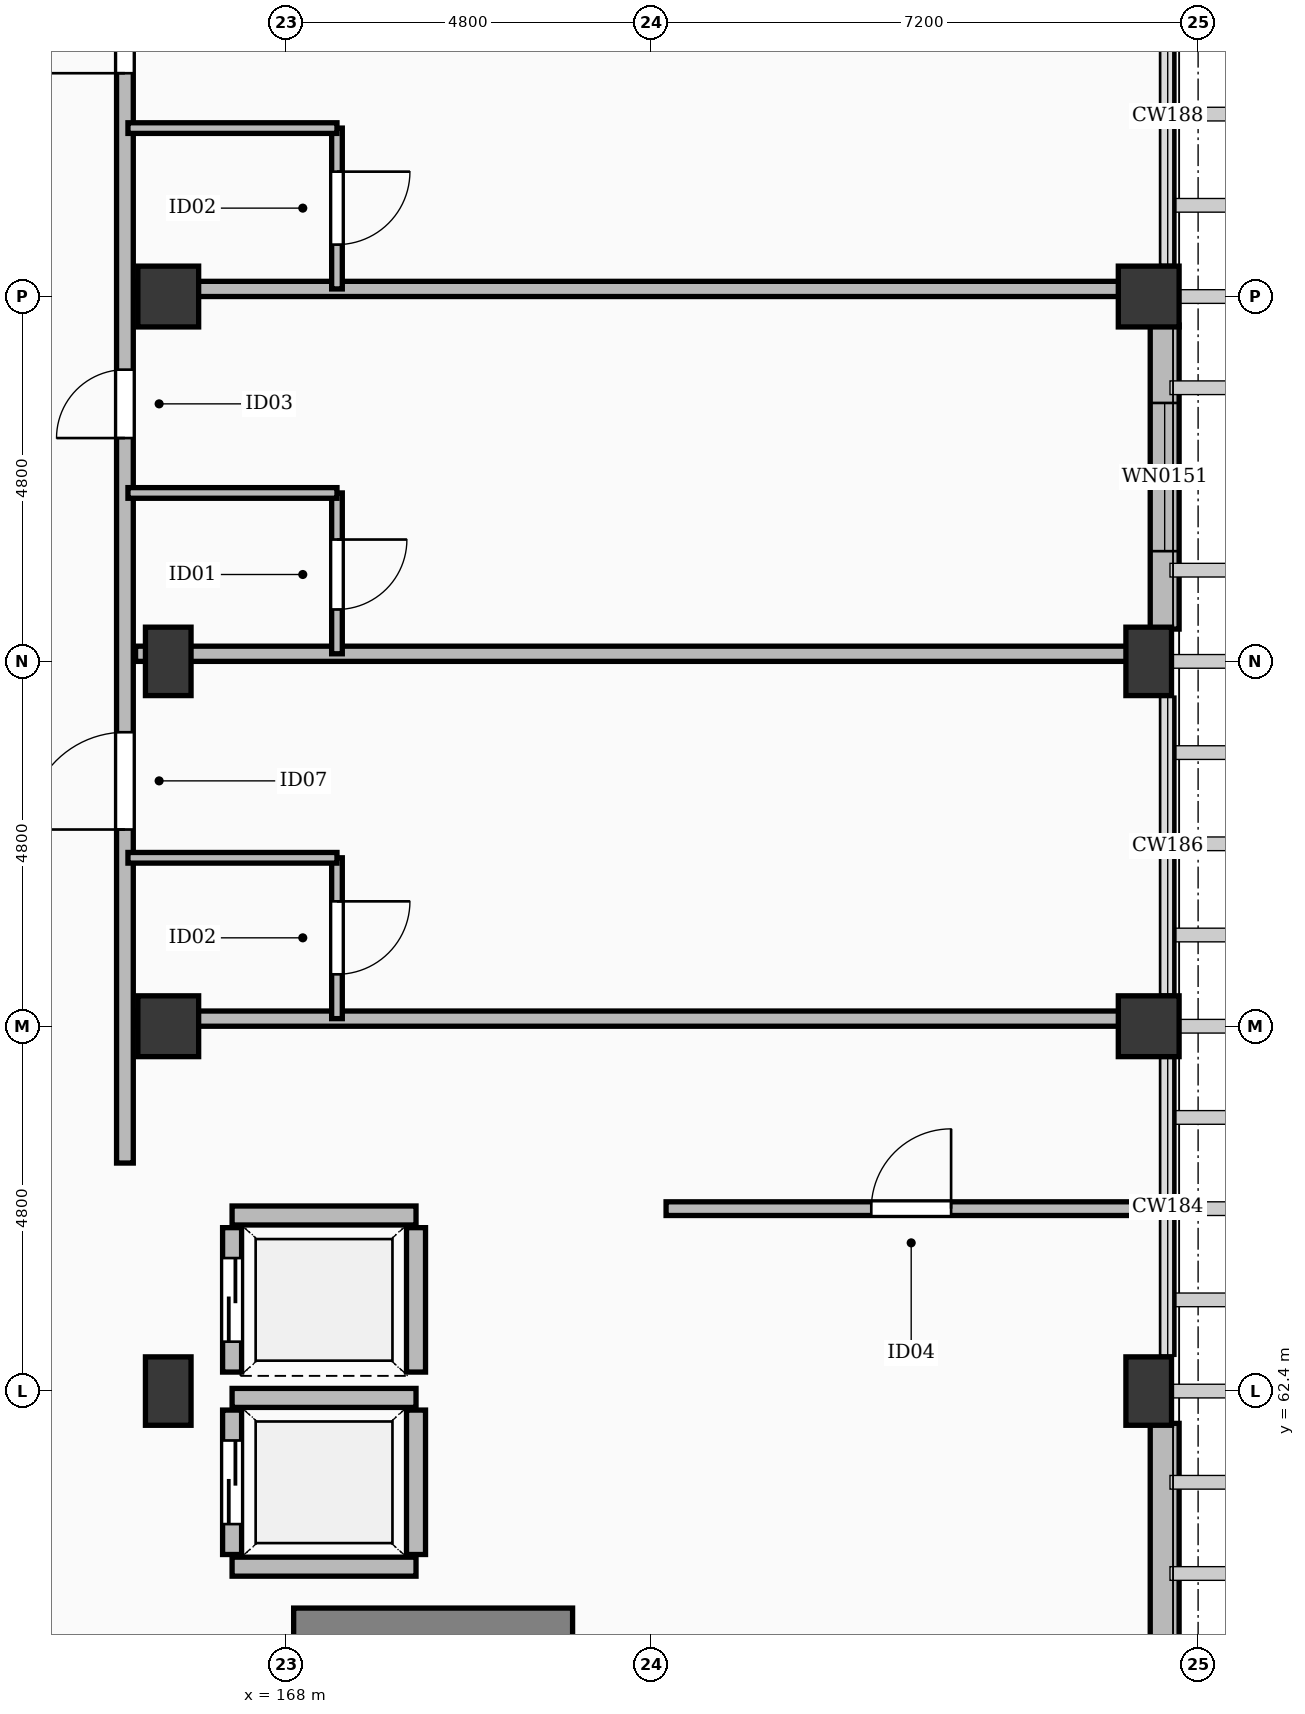
"""IFC4 building model, lengths in metres.
Left out: names, types, materials, properties, quantities, classifications, styles, units other than length and angle.
Written with IfcOpenShell. Run it as: python <this file> out.ifc"""

import sys

from ifc_helpers import new_model, si_unit, direction, frame, frame_2d, origin, origin_2d, place, context, subcontext, project, spatial, rectangle, extrude, element, fill, save


model = new_model("IFC4")
c1 = context("Model", 3, precision=1e-05, world=origin(), true_north=direction((0.0, 1.0)))
c2 = subcontext(c1, "Body", "Model", "MODEL_VIEW")
j1 = project(units=[si_unit("LENGTHUNIT", "METRE"), si_unit("PLANEANGLEUNIT", "RADIAN")], contexts=[c1])
p1 = place(None, origin())
s1 = spatial("IfcSite", under=j1, at=p1, CompositionType="ELEMENT")
p2 = place(p1, origin())
s2 = spatial("IfcBuilding", under=s1, at=p2, CompositionType="ELEMENT")
p3 = place(p2, frame((0.0, 0.0, 21.0)))
s3 = spatial("IfcBuildingStorey", under=s2, at=p3, CompositionType="ELEMENT", Elevation=21.0)
for number, where, z_axis, x_axis in (
    (1, (166.45, 67.2, 0.0), (0.0, 0.0, 1.0), (1.0, 0.0, 0.0)),
    (2, (166.45, 76.8, 0.0), (0.0, 0.0, 1.0), (1.0, 0.0, 0.0)),
    (3, (179.35, 67.2, 0.0), (0.0, 0.0, 1.0), (1.0, 0.0, 0.0)),
    (4, (179.35, 76.8, 0.0), (0.0, 0.0, 1.0), (1.0, 0.0, 0.0)),
):
    element("IfcColumn", number, at=place(p3, frame(where, z_axis=z_axis, x_axis=x_axis)), inside=s3, PredefinedType="COLUMN", context=c2, shape_type="SweptSolid", body=[
        extrude(rectangle(XDim=0.8, YDim=0.8, at=origin_2d()), origin(), (0.0, 0.0, 1.0), 3.6),
    ])
for number, where, z_axis, x_axis in (
    (5, (166.45, 62.4, -0.26), (0.0, 0.0, 1.0), (1.0, 0.0, 0.0)),
    (6, (166.45, 72.0, -0.26), (0.0, 0.0, 1.0), (1.0, 0.0, 0.0)),
    (7, (179.35, 62.4, -0.26), (0.0, 0.0, 1.0), (1.0, 0.0, 0.0)),
    (8, (179.35, 72.0, -0.26), (0.0, 0.0, 1.0), (1.0, 0.0, 0.0)),
):
    element("IfcColumn", number, at=place(p3, frame(where, z_axis=z_axis, x_axis=x_axis)), inside=s3, PredefinedType="COLUMN", context=c2, shape_type="SweptSolid", body=[
        extrude(rectangle(XDim=0.6, YDim=0.9, at=origin_2d()), origin(), (0.0, 0.0, 1.0), 3.86),
    ])
p4 = place(p3, frame((179.56, 61.975, 0.0), z_axis=(0.0, 0.0, 1.0), x_axis=(0.0, -1.0, 0.0)))
e9 = element("IfcWall", 9, at=p4, inside=s3, PredefinedType="SOLIDWALL", context=c2, shape_type="SweptSolid", body=[
    extrude(rectangle(XDim=4.0, YDim=0.38, at=frame_2d((2.0, 0.0))), origin(), (0.0, 0.0, 1.0), 2.582),
])
p5 = place(p3, frame((179.56, 76.425, 0.0), z_axis=(0.0, 0.0, 1.0), x_axis=(0.0, -1.0, 0.0)))
e10 = element("IfcWall", 10, at=p5, inside=s3, PredefinedType="SOLIDWALL", context=c2, shape_type="SweptSolid", body=[
    extrude(rectangle(XDim=4.0, YDim=0.38, at=frame_2d((2.0, 0.0))), origin(), (0.0, 0.0, 1.0), 2.582),
])
p6 = place(p5, frame((1.025, 0.0, 0.55)))
e11 = element("IfcOpeningElement", 11, at=p6, cuts=e10, PredefinedType="OPENING", context=c2, shape_type="SweptSolid", body=[
    extrude(rectangle(XDim=1.95, YDim=1.77, at=frame_2d((0.975, 0.885))), frame((0.0, 0.202, 0.0), z_axis=(0.0, -1.0, 0.0), x_axis=(1.0, 0.0, 0.0)), (0.0, 0.0, 1.0), 0.404),
])
p7 = place(p3, frame((168.1, 59.32, 0.0), z_axis=(0.0, 0.0, 1.0), x_axis=(1.0, 0.0, 0.0)))
e12 = element("IfcWall", 12, at=p7, inside=s3, PredefinedType="SHEAR", context=c2, shape_type="SweptSolid", body=[
    extrude(rectangle(XDim=3.67, YDim=0.45, at=frame_2d((1.835, 0.0))), origin(), (0.0, 0.0, 1.0), 3.34),
])
p8 = place(p3, frame((167.29, 60.09, 0.0), z_axis=(0.0, 0.0, 1.0), x_axis=(1.0, 0.0, 0.0)))
e13 = element("IfcWall", 13, at=p8, inside=s3, PredefinedType="SOLIDWALL", context=c2, shape_type="SweptSolid", body=[
    extrude(rectangle(XDim=2.42, YDim=0.25, at=frame_2d((1.21, 0.0))), origin(), (0.0, 0.0, 1.0), 3.34),
])
p9 = place(p3, frame((167.29, 62.31, 0.0), z_axis=(0.0, 0.0, 1.0), x_axis=(1.0, 0.0, 0.0)))
e14 = element("IfcWall", 14, at=p9, inside=s3, PredefinedType="SOLIDWALL", context=c2, shape_type="SweptSolid", body=[
    extrude(rectangle(XDim=2.42, YDim=0.25, at=frame_2d((1.21, 0.0))), origin(), (0.0, 0.0, 1.0), 2.652),
])
p10 = place(p3, frame((167.29, 60.25, 0.0), z_axis=(0.0, 0.0, 1.0), x_axis=(0.0, 1.0, 0.0)))
e15 = element("IfcWall", 15, at=p10, inside=s3, PredefinedType="SOLIDWALL", context=c2, shape_type="SweptSolid", body=[
    extrude(rectangle(XDim=1.9, YDim=0.25, at=frame_2d((0.95, 0.0))), origin(), (0.0, 0.0, 1.0), 2.652),
])
p11 = place(p10, frame((0.4, 0.0, 0.0)))
e16 = element("IfcOpeningElement", 16, at=p11, cuts=e15, PredefinedType="OPENING", context=c2, shape_type="SweptSolid", body=[
    extrude(rectangle(XDim=1.1, YDim=2.2, at=frame_2d((0.55, 1.1))), frame((0.0, 0.137, 0.0), z_axis=(0.0, -1.0, 0.0), x_axis=(1.0, 0.0, 0.0)), (0.0, 0.0, 1.0), 0.274),
])
p12 = place(p3, frame((169.71, 60.25, 0.0), z_axis=(0.0, 0.0, 1.0), x_axis=(0.0, 1.0, 0.0)))
e17 = element("IfcWall", 17, at=p12, inside=s3, PredefinedType="SOLIDWALL", context=c2, shape_type="SweptSolid", body=[
    extrude(rectangle(XDim=1.9, YDim=0.25, at=frame_2d((0.95, 0.0))), origin(), (0.0, 0.0, 1.0), 2.652),
])
p13 = place(p3, frame((167.29, 64.71, 0.0), z_axis=(0.0, 0.0, 1.0), x_axis=(1.0, 0.0, 0.0)))
e18 = element("IfcWall", 18, at=p13, inside=s3, PredefinedType="SOLIDWALL", context=c2, shape_type="SweptSolid", body=[
    extrude(rectangle(XDim=2.42, YDim=0.25, at=frame_2d((1.21, 0.0))), origin(), (0.0, 0.0, 1.0), 3.34),
])
p14 = place(p3, frame((167.29, 62.65, 0.0), z_axis=(0.0, 0.0, 1.0), x_axis=(0.0, 1.0, 0.0)))
e19 = element("IfcWall", 19, at=p14, inside=s3, PredefinedType="SOLIDWALL", context=c2, shape_type="SweptSolid", body=[
    extrude(rectangle(XDim=1.9, YDim=0.25, at=frame_2d((0.95, 0.0))), origin(), (0.0, 0.0, 1.0), 2.652),
])
p15 = place(p14, frame((0.4, 0.0, 0.0)))
e20 = element("IfcOpeningElement", 20, at=p15, cuts=e19, PredefinedType="OPENING", context=c2, shape_type="SweptSolid", body=[
    extrude(rectangle(XDim=1.1, YDim=2.2, at=frame_2d((0.55, 1.1))), frame((0.0, 0.137, 0.0), z_axis=(0.0, -1.0, 0.0), x_axis=(1.0, 0.0, 0.0)), (0.0, 0.0, 1.0), 0.274),
])
p16 = place(p3, frame((169.71, 62.65, 0.0), z_axis=(0.0, 0.0, 1.0), x_axis=(0.0, 1.0, 0.0)))
e21 = element("IfcWall", 21, at=p16, inside=s3, PredefinedType="SOLIDWALL", context=c2, shape_type="SweptSolid", body=[
    extrude(rectangle(XDim=1.9, YDim=0.25, at=frame_2d((0.95, 0.0))), origin(), (0.0, 0.0, 1.0), 2.652),
])
p17 = place(p3, frame((165.88, 65.4, 0.0), z_axis=(0.0, 0.0, 1.0), x_axis=(0.0, 1.0, 0.0)))
e22 = element("IfcWall", 22, at=p17, inside=s3, PredefinedType="PARTITIONING", context=c2, shape_type="SweptSolid", body=[
    extrude(rectangle(XDim=60.25, YDim=0.22, at=frame_2d((30.125, 0.0))), origin(), (0.0, 0.0, 1.0), 2.582),
])
p18 = place(p17, frame((4.388, 0.0, 0.0)))
e23 = element("IfcOpeningElement", 23, at=p18, cuts=e22, PredefinedType="OPENING", context=c2, shape_type="SweptSolid", body=[
    extrude(rectangle(XDim=1.28, YDim=2.16, at=frame_2d((0.64, 1.08))), frame((0.0, 0.122, 0.0), z_axis=(0.0, -1.0, 0.0), x_axis=(1.0, 0.0, 0.0)), (0.0, 0.0, 1.0), 0.244),
])
p19 = place(p17, frame((9.538, 0.0, 0.0)))
e24 = element("IfcOpeningElement", 24, at=p19, cuts=e22, PredefinedType="OPENING", context=c2, shape_type="SweptSolid", body=[
    extrude(rectangle(XDim=0.9, YDim=2.08, at=frame_2d((0.45, 1.04))), frame((0.0, 0.122, 0.0), z_axis=(0.0, -1.0, 0.0), x_axis=(1.0, 0.0, 0.0)), (0.0, 0.0, 1.0), 0.244),
])
p20 = place(p17, frame((14.338, 0.0, 0.0)))
e25 = element("IfcOpeningElement", 25, at=p20, cuts=e22, PredefinedType="OPENING", context=c2, shape_type="SweptSolid", body=[
    extrude(rectangle(XDim=1.05, YDim=2.22, at=frame_2d((0.525, 1.11))), frame((0.0, 0.122, 0.0), z_axis=(0.0, -1.0, 0.0), x_axis=(1.0, 0.0, 0.0)), (0.0, 0.0, 1.0), 0.244),
])
p21 = place(p17, frame((19.138, 0.0, 0.0)))
e26 = element("IfcOpeningElement", 26, at=p21, cuts=e22, PredefinedType="OPENING", context=c2, shape_type="SweptSolid", body=[
    extrude(rectangle(XDim=1.02, YDim=2.2, at=frame_2d((0.51, 1.1))), frame((0.0, 0.122, 0.0), z_axis=(0.0, -1.0, 0.0), x_axis=(1.0, 0.0, 0.0)), (0.0, 0.0, 1.0), 0.244),
])
p22 = place(p17, frame((23.938, 0.0, 0.0)))
e27 = element("IfcOpeningElement", 27, at=p22, cuts=e22, PredefinedType="OPENING", context=c2, shape_type="SweptSolid", body=[
    extrude(rectangle(XDim=1.14, YDim=2.26, at=frame_2d((0.57, 1.13))), frame((0.0, 0.122, 0.0), z_axis=(0.0, -1.0, 0.0), x_axis=(1.0, 0.0, 0.0)), (0.0, 0.0, 1.0), 0.244),
])
p23 = place(p17, frame((28.738, 0.0, 0.0)))
e28 = element("IfcOpeningElement", 28, at=p23, cuts=e22, PredefinedType="OPENING", context=c2, shape_type="SweptSolid", body=[
    extrude(rectangle(XDim=0.98, YDim=2.15, at=frame_2d((0.49, 1.075))), frame((0.0, 0.122, 0.0), z_axis=(0.0, -1.0, 0.0), x_axis=(1.0, 0.0, 0.0)), (0.0, 0.0, 1.0), 0.244),
])
p24 = place(p17, frame((33.188, 0.0, 0.0)))
e29 = element("IfcOpeningElement", 29, at=p24, cuts=e22, PredefinedType="OPENING", context=c2, shape_type="SweptSolid", body=[
    extrude(rectangle(XDim=1.28, YDim=2.16, at=frame_2d((0.64, 1.08))), frame((0.0, 0.122, 0.0), z_axis=(0.0, -1.0, 0.0), x_axis=(1.0, 0.0, 0.0)), (0.0, 0.0, 1.0), 0.244),
])
p25 = place(p17, frame((38.338, 0.0, 0.0)))
e30 = element("IfcOpeningElement", 30, at=p25, cuts=e22, PredefinedType="OPENING", context=c2, shape_type="SweptSolid", body=[
    extrude(rectangle(XDim=0.9, YDim=2.08, at=frame_2d((0.45, 1.04))), frame((0.0, 0.122, 0.0), z_axis=(0.0, -1.0, 0.0), x_axis=(1.0, 0.0, 0.0)), (0.0, 0.0, 1.0), 0.244),
])
p26 = place(p17, frame((43.138, 0.0, 0.0)))
e31 = element("IfcOpeningElement", 31, at=p26, cuts=e22, PredefinedType="OPENING", context=c2, shape_type="SweptSolid", body=[
    extrude(rectangle(XDim=1.05, YDim=2.22, at=frame_2d((0.525, 1.11))), frame((0.0, 0.122, 0.0), z_axis=(0.0, -1.0, 0.0), x_axis=(1.0, 0.0, 0.0)), (0.0, 0.0, 1.0), 0.244),
])
p27 = place(p17, frame((47.938, 0.0, 0.0)))
e32 = element("IfcOpeningElement", 32, at=p27, cuts=e22, PredefinedType="OPENING", context=c2, shape_type="SweptSolid", body=[
    extrude(rectangle(XDim=1.02, YDim=2.2, at=frame_2d((0.51, 1.1))), frame((0.0, 0.122, 0.0), z_axis=(0.0, -1.0, 0.0), x_axis=(1.0, 0.0, 0.0)), (0.0, 0.0, 1.0), 0.244),
])
p28 = place(p17, frame((52.738, 0.0, 0.0)))
e33 = element("IfcOpeningElement", 33, at=p28, cuts=e22, PredefinedType="OPENING", context=c2, shape_type="SweptSolid", body=[
    extrude(rectangle(XDim=1.14, YDim=2.26, at=frame_2d((0.57, 1.13))), frame((0.0, 0.122, 0.0), z_axis=(0.0, -1.0, 0.0), x_axis=(1.0, 0.0, 0.0)), (0.0, 0.0, 1.0), 0.244),
])
p29 = place(p17, frame((57.538, 0.0, 0.0)))
e34 = element("IfcOpeningElement", 34, at=p29, cuts=e22, PredefinedType="OPENING", context=c2, shape_type="SweptSolid", body=[
    extrude(rectangle(XDim=0.98, YDim=2.15, at=frame_2d((0.49, 1.075))), frame((0.0, 0.122, 0.0), z_axis=(0.0, -1.0, 0.0), x_axis=(1.0, 0.0, 0.0)), (0.0, 0.0, 1.0), 0.244),
])
p30 = place(p3, frame((173.0, 64.8, 0.0), z_axis=(0.0, 0.0, 1.0), x_axis=(1.0, 0.0, 0.0)))
e35 = element("IfcWall", 35, at=p30, inside=s3, PredefinedType="PARTITIONING", context=c2, shape_type="SweptSolid", body=[
    extrude(rectangle(XDim=6.2, YDim=0.18, at=frame_2d((3.1, 0.0))), origin(), (0.0, 0.0, 1.0), 2.582),
])
p31 = place(p30, frame((2.7, 0.0, 0.0)))
e36 = element("IfcOpeningElement", 36, at=p31, cuts=e35, PredefinedType="OPENING", context=c2, shape_type="SweptSolid", body=[
    extrude(rectangle(XDim=1.05, YDim=2.18, at=frame_2d((0.525, 1.09))), frame((0.0, 0.102, 0.0), z_axis=(0.0, -1.0, 0.0), x_axis=(1.0, 0.0, 0.0)), (0.0, 0.0, 1.0), 0.204),
])
p32 = place(p3, frame((166.02, 67.3, 0.0), z_axis=(0.0, 0.0, 1.0), x_axis=(1.0, 0.0, 0.0)))
e37 = element("IfcWall", 37, at=p32, inside=s3, PredefinedType="PARTITIONING", context=c2, shape_type="SweptSolid", body=[
    extrude(rectangle(XDim=13.23, YDim=0.2, at=frame_2d((6.615, 0.0))), origin(), (0.0, 0.0, 1.0), 2.582),
])
p33 = place(p3, frame((168.67, 67.3, 0.0), z_axis=(0.0, 0.0, 1.0), x_axis=(0.0, 1.0, 0.0)))
e38 = element("IfcWall", 38, at=p33, inside=s3, PredefinedType="PARTITIONING", context=c2, shape_type="SweptSolid", body=[
    extrude(rectangle(XDim=2.116, YDim=0.14, at=frame_2d((1.058, 0.0))), origin(), (0.0, 0.0, 1.0), 2.652),
])
p34 = place(p33, frame((0.583, 0.0, 0.0)))
e39 = element("IfcOpeningElement", 39, at=p34, cuts=e38, PredefinedType="OPENING", context=c2, shape_type="SweptSolid", body=[
    extrude(rectangle(XDim=0.96, YDim=2.12, at=frame_2d((0.48, 1.06))), frame((0.0, 0.082, 0.0), z_axis=(0.0, -1.0, 0.0), x_axis=(1.0, 0.0, 0.0)), (0.0, 0.0, 1.0), 0.164),
])
p35 = place(p3, frame((165.92, 69.416, 0.0), z_axis=(0.0, 0.0, 1.0), x_axis=(1.0, 0.0, 0.0)))
e40 = element("IfcWall", 40, at=p35, inside=s3, PredefinedType="PARTITIONING", context=c2, shape_type="SweptSolid", body=[
    extrude(rectangle(XDim=2.75, YDim=0.14, at=frame_2d((1.375, 0.0))), origin(), (0.0, 0.0, 1.0), 2.652),
])
p36 = place(p3, frame((166.02, 72.1, 0.0), z_axis=(0.0, 0.0, 1.0), x_axis=(1.0, 0.0, 0.0)))
e41 = element("IfcWall", 41, at=p36, inside=s3, PredefinedType="PARTITIONING", context=c2, shape_type="SweptSolid", body=[
    extrude(rectangle(XDim=13.23, YDim=0.2, at=frame_2d((6.615, 0.0))), origin(), (0.0, 0.0, 1.0), 2.582),
])
p37 = place(p3, frame((168.67, 72.1, 0.0), z_axis=(0.0, 0.0, 1.0), x_axis=(0.0, 1.0, 0.0)))
e42 = element("IfcWall", 42, at=p37, inside=s3, PredefinedType="PARTITIONING", context=c2, shape_type="SweptSolid", body=[
    extrude(rectangle(XDim=2.116, YDim=0.14, at=frame_2d((1.058, 0.0))), origin(), (0.0, 0.0, 1.0), 2.652),
])
p38 = place(p37, frame((0.583, 0.0, 0.0)))
e43 = element("IfcOpeningElement", 43, at=p38, cuts=e42, PredefinedType="OPENING", context=c2, shape_type="SweptSolid", body=[
    extrude(rectangle(XDim=0.92, YDim=2.1, at=frame_2d((0.46, 1.05))), frame((0.0, 0.082, 0.0), z_axis=(0.0, -1.0, 0.0), x_axis=(1.0, 0.0, 0.0)), (0.0, 0.0, 1.0), 0.164),
])
p39 = place(p3, frame((165.92, 74.216, 0.0), z_axis=(0.0, 0.0, 1.0), x_axis=(1.0, 0.0, 0.0)))
e44 = element("IfcWall", 44, at=p39, inside=s3, PredefinedType="PARTITIONING", context=c2, shape_type="SweptSolid", body=[
    extrude(rectangle(XDim=2.75, YDim=0.14, at=frame_2d((1.375, 0.0))), origin(), (0.0, 0.0, 1.0), 2.652),
])
p40 = place(p3, frame((166.02, 76.9, 0.0), z_axis=(0.0, 0.0, 1.0), x_axis=(1.0, 0.0, 0.0)))
e45 = element("IfcWall", 45, at=p40, inside=s3, PredefinedType="PARTITIONING", context=c2, shape_type="SweptSolid", body=[
    extrude(rectangle(XDim=13.23, YDim=0.2, at=frame_2d((6.615, 0.0))), origin(), (0.0, 0.0, 1.0), 2.582),
])
p41 = place(p3, frame((168.67, 76.9, 0.0), z_axis=(0.0, 0.0, 1.0), x_axis=(0.0, 1.0, 0.0)))
e46 = element("IfcWall", 46, at=p41, inside=s3, PredefinedType="PARTITIONING", context=c2, shape_type="SweptSolid", body=[
    extrude(rectangle(XDim=2.116, YDim=0.14, at=frame_2d((1.058, 0.0))), origin(), (0.0, 0.0, 1.0), 2.652),
])
p42 = place(p41, frame((0.583, 0.0, 0.0)))
e47 = element("IfcOpeningElement", 47, at=p42, cuts=e46, PredefinedType="OPENING", context=c2, shape_type="SweptSolid", body=[
    extrude(rectangle(XDim=0.96, YDim=2.12, at=frame_2d((0.48, 1.06))), frame((0.0, 0.082, 0.0), z_axis=(0.0, -1.0, 0.0), x_axis=(1.0, 0.0, 0.0)), (0.0, 0.0, 1.0), 0.164),
])
p43 = place(p3, frame((165.92, 79.016, 0.0), z_axis=(0.0, 0.0, 1.0), x_axis=(1.0, 0.0, 0.0)))
e48 = element("IfcWall", 48, at=p43, inside=s3, PredefinedType="PARTITIONING", context=c2, shape_type="SweptSolid", body=[
    extrude(rectangle(XDim=2.75, YDim=0.14, at=frame_2d((1.375, 0.0))), origin(), (0.0, 0.0, 1.0), 2.652),
])
p44 = place(p6, origin())
e49 = element("IfcWindow", 49, at=p44, inside=s3, PartitioningType="SINGLE_PANEL", PredefinedType="WINDOW", context=c2, shape_type="SweptSolid", body=[
    extrude(rectangle(XDim=1.95, YDim=1.77, at=frame_2d((0.975, 0.885))), frame((0.0, 0.03, 0.0), z_axis=(0.0, -1.0, 0.0), x_axis=(1.0, 0.0, 0.0)), (0.0, 0.0, 1.0), 0.06),
])
fill(e11, e49)
p45 = place(p11, origin())
e50 = element("IfcDoor", 50, at=p45, inside=s3, OperationType="SLIDING_TO_LEFT", PredefinedType="DOOR", context=c2, shape_type="SweptSolid", body=[
    extrude(rectangle(XDim=1.1, YDim=2.2, at=frame_2d((0.55, 1.1))), frame((0.0, 0.025, 0.0), z_axis=(0.0, -1.0, 0.0), x_axis=(1.0, 0.0, 0.0)), (0.0, 0.0, 1.0), 0.05),
])
fill(e16, e50)
p46 = place(p15, origin())
e51 = element("IfcDoor", 51, at=p46, inside=s3, OperationType="SLIDING_TO_LEFT", PredefinedType="DOOR", context=c2, shape_type="SweptSolid", body=[
    extrude(rectangle(XDim=1.1, YDim=2.2, at=frame_2d((0.55, 1.1))), frame((0.0, 0.025, 0.0), z_axis=(0.0, -1.0, 0.0), x_axis=(1.0, 0.0, 0.0)), (0.0, 0.0, 1.0), 0.05),
])
fill(e20, e51)
p47 = place(p31, origin())
e52 = element("IfcDoor", 52, at=p47, inside=s3, OperationType="SINGLE_SWING_RIGHT", PredefinedType="DOOR", context=c2, shape_type="SweptSolid", body=[
    extrude(rectangle(XDim=1.05, YDim=2.18, at=frame_2d((0.525, 1.09))), frame((0.0, 0.025, 0.0), z_axis=(0.0, -1.0, 0.0), x_axis=(1.0, 0.0, 0.0)), (0.0, 0.0, 1.0), 0.05),
])
fill(e36, e52)
p48 = place(p18, origin())
e53 = element("IfcDoor", 53, at=p48, inside=s3, OperationType="SINGLE_SWING_LEFT", PredefinedType="DOOR", context=c2, shape_type="SweptSolid", body=[
    extrude(rectangle(XDim=1.28, YDim=2.16, at=frame_2d((0.64, 1.08))), frame((0.0, 0.025, 0.0), z_axis=(0.0, -1.0, 0.0), x_axis=(1.0, 0.0, 0.0)), (0.0, 0.0, 1.0), 0.05),
])
fill(e23, e53)
p49 = place(p34, frame((0.96, 0.0, 0.0), z_axis=(0.0, 0.0, 1.0), x_axis=(-1.0, 0.0, 0.0)))
e54 = element("IfcDoor", 54, at=p49, inside=s3, OperationType="SINGLE_SWING_RIGHT", PredefinedType="DOOR", context=c2, shape_type="SweptSolid", body=[
    extrude(rectangle(XDim=0.96, YDim=2.12, at=frame_2d((0.48, 1.06))), frame((0.0, 0.025, 0.0), z_axis=(0.0, -1.0, 0.0), x_axis=(1.0, 0.0, 0.0)), (0.0, 0.0, 1.0), 0.05),
])
fill(e39, e54)
p50 = place(p19, origin())
e55 = element("IfcDoor", 55, at=p50, inside=s3, OperationType="SINGLE_SWING_LEFT", PredefinedType="DOOR", context=c2, shape_type="SweptSolid", body=[
    extrude(rectangle(XDim=0.9, YDim=2.08, at=frame_2d((0.45, 1.04))), frame((0.0, 0.025, 0.0), z_axis=(0.0, -1.0, 0.0), x_axis=(1.0, 0.0, 0.0)), (0.0, 0.0, 1.0), 0.05),
])
fill(e24, e55)
p51 = place(p38, frame((0.92, 0.0, 0.0), z_axis=(0.0, 0.0, 1.0), x_axis=(-1.0, 0.0, 0.0)))
e56 = element("IfcDoor", 56, at=p51, inside=s3, OperationType="SINGLE_SWING_RIGHT", PredefinedType="DOOR", context=c2, shape_type="SweptSolid", body=[
    extrude(rectangle(XDim=0.92, YDim=2.1, at=frame_2d((0.46, 1.05))), frame((0.0, 0.025, 0.0), z_axis=(0.0, -1.0, 0.0), x_axis=(1.0, 0.0, 0.0)), (0.0, 0.0, 1.0), 0.05),
])
fill(e43, e56)
p52 = place(p20, origin())
e57 = element("IfcDoor", 57, at=p52, inside=s3, OperationType="SINGLE_SWING_LEFT", PredefinedType="DOOR", context=c2, shape_type="SweptSolid", body=[
    extrude(rectangle(XDim=1.05, YDim=2.22, at=frame_2d((0.525, 1.11))), frame((0.0, 0.025, 0.0), z_axis=(0.0, -1.0, 0.0), x_axis=(1.0, 0.0, 0.0)), (0.0, 0.0, 1.0), 0.05),
])
fill(e25, e57)
p53 = place(p42, frame((0.96, 0.0, 0.0), z_axis=(0.0, 0.0, 1.0), x_axis=(-1.0, 0.0, 0.0)))
e58 = element("IfcDoor", 58, at=p53, inside=s3, OperationType="SINGLE_SWING_RIGHT", PredefinedType="DOOR", context=c2, shape_type="SweptSolid", body=[
    extrude(rectangle(XDim=0.96, YDim=2.12, at=frame_2d((0.48, 1.06))), frame((0.0, 0.025, 0.0), z_axis=(0.0, -1.0, 0.0), x_axis=(1.0, 0.0, 0.0)), (0.0, 0.0, 1.0), 0.05),
])
fill(e47, e58)
save(model, sys.argv[1])
